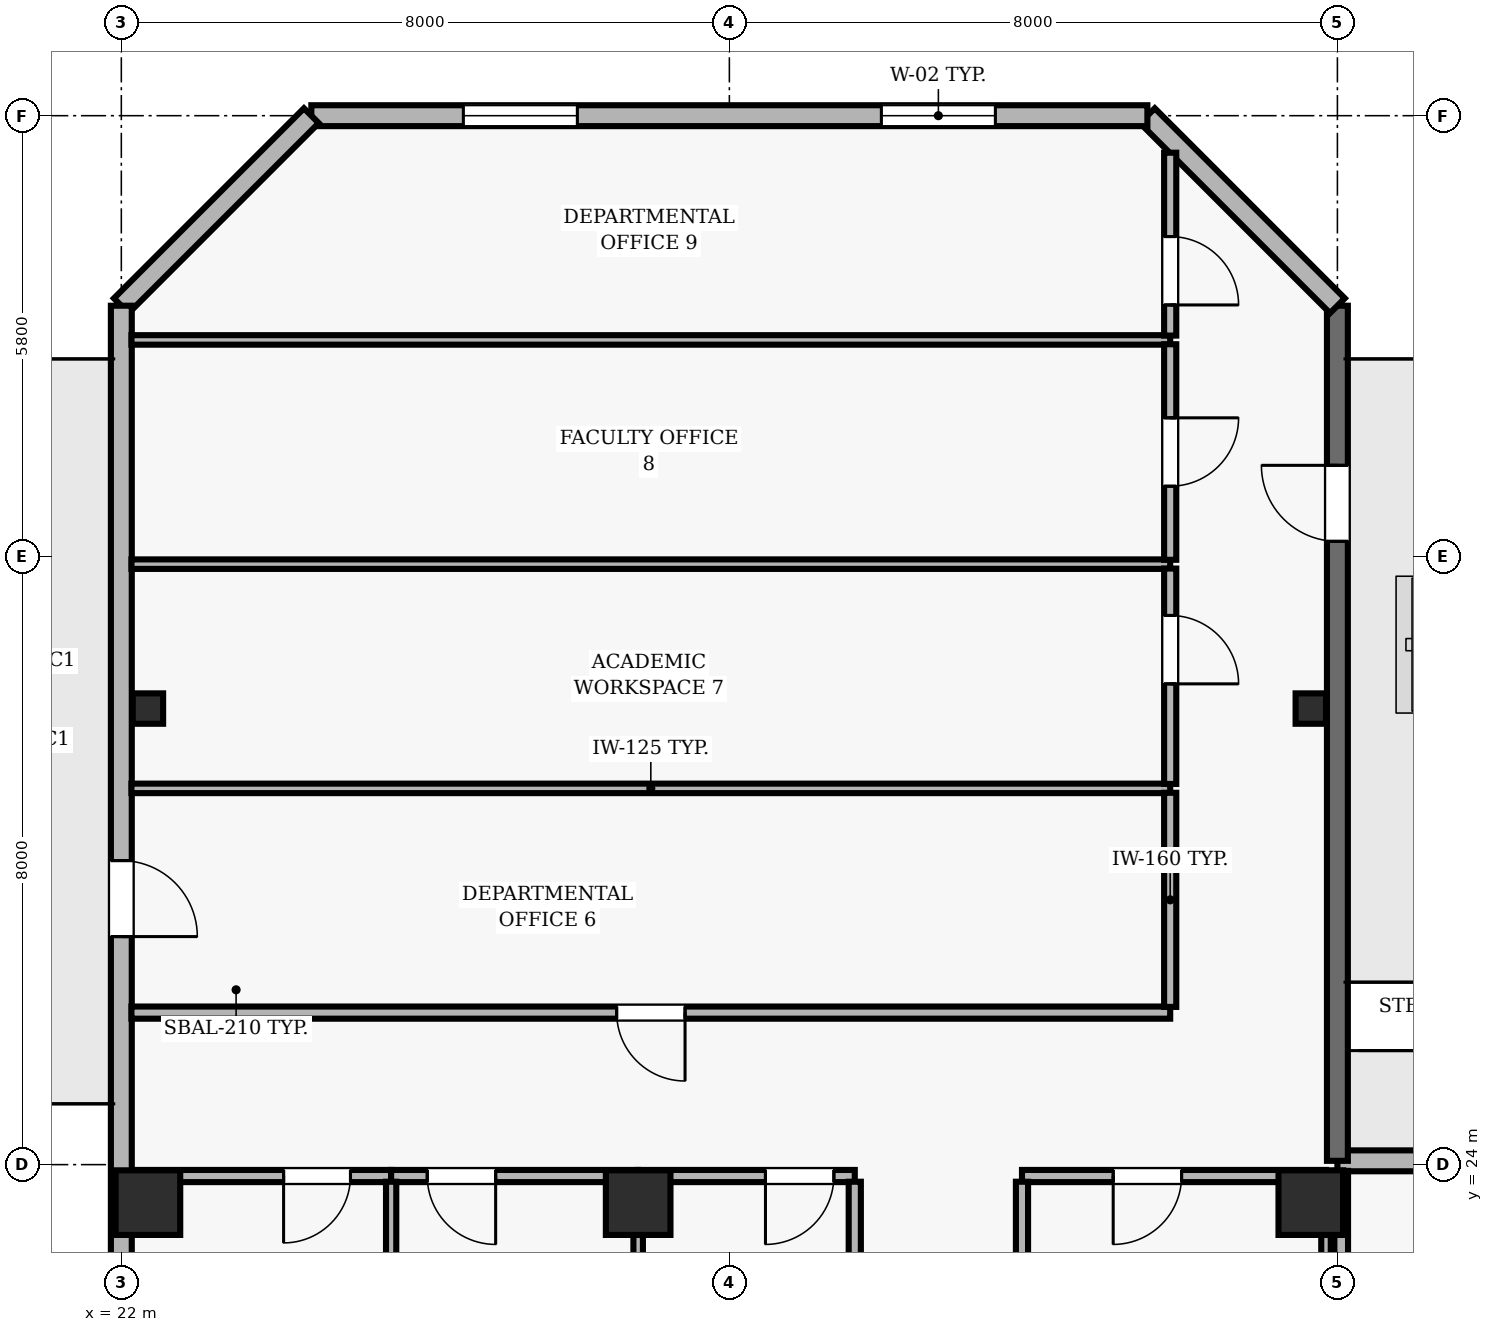
"""IFC4 building model, lengths in metres.
Left out: names, types, materials, properties, quantities, classifications, styles, units other than length and angle.
Written with IfcOpenShell. Run it as: python <this file> out.ifc"""

import sys

from ifc_helpers import new_model, si_unit, direction, frame, frame_2d, origin, origin_2d, place, context, subcontext, project, spatial, rectangle, hollow_rectangle, extrude, element, fill, save


model = new_model("IFC4")
c1 = context("Model", 3, precision=1e-05, world=origin(), true_north=direction((0.0, 1.0)))
c2 = subcontext(c1, "Body", "Model", "MODEL_VIEW")
j1 = project(units=[si_unit("LENGTHUNIT", "METRE"), si_unit("PLANEANGLEUNIT", "RADIAN")], contexts=[c1])
p1 = place(None, origin())
s1 = spatial("IfcSite", under=j1, at=p1, CompositionType="ELEMENT")
p2 = place(p1, origin())
s2 = spatial("IfcBuilding", under=s1, at=p2, CompositionType="ELEMENT")
p3 = place(p2, frame((0.0, 0.0, 259.9)))
s3 = spatial("IfcBuildingStorey", under=s2, at=p3, CompositionType="ELEMENT", Elevation=259.9)
for number, where, z_axis, x_axis in (
    (1, (22.35, 23.5, 0.0), (0.0, 0.0, 1.0), (1.0, 0.0, 0.0)),
    (2, (28.8, 23.5, 0.0), (0.0, 0.0, 1.0), (1.0, 0.0, 0.0)),
    (3, (37.65, 23.5, 0.0), (0.0, 0.0, 1.0), (1.0, 0.0, 0.0)),
):
    element("IfcColumn", number, at=place(p3, frame(where, z_axis=z_axis, x_axis=x_axis)), inside=s3, PredefinedType="COLUMN", context=c2, shape_type="SweptSolid", body=[
        extrude(rectangle(XDim=0.85, YDim=0.85, at=origin_2d()), origin(), (0.0, 0.0, 1.0), 3.9),
    ])
for number, where, z_axis, x_axis in (
    (4, (22.35, 30.0, 0.0), (0.0, 0.0, 1.0), (1.0, 0.0, 0.0)),
    (5, (37.65, 30.0, 0.0), (0.0, 0.0, 1.0), (1.0, 0.0, 0.0)),
):
    element("IfcColumn", number, at=place(p3, frame(where, z_axis=z_axis, x_axis=x_axis)), inside=s3, PredefinedType="COLUMN", context=c2, shape_type="SweptSolid", body=[
        extrude(hollow_rectangle(XDim=0.4, YDim=0.4, WallThickness=0.02, at=origin_2d()), origin(), (0.0, 0.0, 1.0), 3.9),
    ])
p4 = place(p3, frame((43.0, 24.05, 0.0), z_axis=(0.0, 0.0, 1.0), x_axis=(-1.0, 0.0, 0.0)))
e6 = element("IfcWall", 6, at=p4, inside=s3, PredefinedType="SOLIDWALL", context=c2, shape_type="SweptSolid", body=[
    extrude(rectangle(XDim=5.0, YDim=0.275, at=frame_2d((2.5, 0.0))), origin(), (0.0, 0.0, 1.0), 3.69),
])
p5 = place(p4, frame((1.825, 0.0, 0.0)))
e7 = element("IfcOpeningElement", 7, at=p5, cuts=e6, PredefinedType="OPENING", context=c2, shape_type="SweptSolid", body=[
    extrude(rectangle(XDim=1.35, YDim=2.2, at=frame_2d((0.675, 1.1))), frame((0.0, 0.147, 0.0), z_axis=(0.0, -1.0, 0.0), x_axis=(1.0, 0.0, 0.0)), (0.0, 0.0, 1.0), 0.295),
])
p6 = place(p3, frame((38.0, 24.05, 0.0), z_axis=(0.0, 0.0, 1.0), x_axis=(0.0, 1.0, 0.0)))
e8 = element("IfcWall", 8, at=p6, inside=s3, PredefinedType="SOLIDWALL", context=c2, shape_type="SweptSolid", body=[
    extrude(rectangle(XDim=11.25, YDim=0.275, at=frame_2d((5.625, 0.0))), origin(), (0.0, 0.0, 1.0), 3.69),
])
p7 = place(p6, frame((8.15, 0.0, 0.0)))
e9 = element("IfcOpeningElement", 9, at=p7, cuts=e8, PredefinedType="OPENING", context=c2, shape_type="SweptSolid", body=[
    extrude(rectangle(XDim=1.0, YDim=2.2, at=frame_2d((0.5, 1.1))), frame((0.0, 0.147, 0.0), z_axis=(0.0, -1.0, 0.0), x_axis=(1.0, 0.0, 0.0)), (0.0, 0.0, 1.0), 0.295),
])
p8 = place(p3, frame((38.0, 35.3, 0.0), z_axis=(0.0, 0.0, 1.0), x_axis=(-0.707106781187, 0.707106781187, 0.0)))
e10 = element("IfcWall", 10, at=p8, inside=s3, PredefinedType="SOLIDWALL", context=c2, shape_type="SweptSolid", body=[
    extrude(rectangle(XDim=3.536, YDim=0.275, at=frame_2d((1.768, 0.0))), origin(), (0.0, 0.0, 1.0), 3.69),
])
p9 = place(p3, frame((35.5, 37.8, 0.0), z_axis=(0.0, 0.0, 1.0), x_axis=(-1.0, 0.0, 0.0)))
e11 = element("IfcWall", 11, at=p9, inside=s3, PredefinedType="SOLIDWALL", context=c2, shape_type="SweptSolid", body=[
    extrude(rectangle(XDim=11.0, YDim=0.275, at=frame_2d((5.5, 0.0))), origin(), (0.0, 0.0, 1.0), 3.69),
])
p10 = place(p9, frame((2.0, 0.0, 0.9)))
e12 = element("IfcOpeningElement", 12, at=p10, cuts=e11, PredefinedType="OPENING", context=c2, shape_type="SweptSolid", body=[
    extrude(rectangle(XDim=1.5, YDim=1.6, at=frame_2d((0.75, 0.8))), frame((0.0, 0.147, 0.0), z_axis=(0.0, -1.0, 0.0), x_axis=(1.0, 0.0, 0.0)), (0.0, 0.0, 1.0), 0.295),
])
p11 = place(p9, frame((7.5, 0.0, 0.9)))
e13 = element("IfcOpeningElement", 13, at=p11, cuts=e11, PredefinedType="OPENING", context=c2, shape_type="SweptSolid", body=[
    extrude(rectangle(XDim=1.5, YDim=1.6, at=frame_2d((0.75, 0.8))), frame((0.0, 0.147, 0.0), z_axis=(0.0, -1.0, 0.0), x_axis=(1.0, 0.0, 0.0)), (0.0, 0.0, 1.0), 0.295),
])
p12 = place(p3, frame((24.5, 37.8, 0.0), z_axis=(0.0, 0.0, 1.0), x_axis=(-0.707106781187, -0.707106781187, 0.0)))
e14 = element("IfcWall", 14, at=p12, inside=s3, PredefinedType="SOLIDWALL", context=c2, shape_type="SweptSolid", body=[
    extrude(rectangle(XDim=3.536, YDim=0.275, at=frame_2d((1.768, 0.0))), origin(), (0.0, 0.0, 1.0), 3.69),
])
p13 = place(p3, frame((22.0, 35.3, 0.0), z_axis=(0.0, 0.0, 1.0), x_axis=(0.0, -1.0, 0.0)))
e15 = element("IfcWall", 15, at=p13, inside=s3, PredefinedType="SOLIDWALL", context=c2, shape_type="SweptSolid", body=[
    extrude(rectangle(XDim=32.8, YDim=0.275, at=frame_2d((16.4, 0.0))), origin(), (0.0, 0.0, 1.0), 3.69),
])
p14 = place(p13, frame((7.3, 0.0, 0.0)))
e16 = element("IfcOpeningElement", 16, at=p14, cuts=e15, PredefinedType="OPENING", context=c2, shape_type="SweptSolid", body=[
    extrude(rectangle(XDim=1.0, YDim=2.2, at=frame_2d((0.5, 1.1))), frame((0.0, 0.147, 0.0), z_axis=(0.0, -1.0, 0.0), x_axis=(1.0, 0.0, 0.0)), (0.0, 0.0, 1.0), 0.295),
])
p15 = place(p13, frame((12.617, 0.0, 0.9)))
e17 = element("IfcOpeningElement", 17, at=p15, cuts=e15, PredefinedType="OPENING", context=c2, shape_type="SweptSolid", body=[
    extrude(rectangle(XDim=2.1, YDim=1.6, at=frame_2d((1.05, 0.8))), frame((0.0, 0.147, 0.0), z_axis=(0.0, -1.0, 0.0), x_axis=(1.0, 0.0, 0.0)), (0.0, 0.0, 1.0), 0.295),
])
p16 = place(p13, frame((17.633, 0.0, 0.9)))
e18 = element("IfcOpeningElement", 18, at=p16, cuts=e15, PredefinedType="OPENING", context=c2, shape_type="SweptSolid", body=[
    extrude(rectangle(XDim=2.1, YDim=1.6, at=frame_2d((1.05, 0.8))), frame((0.0, 0.147, 0.0), z_axis=(0.0, -1.0, 0.0), x_axis=(1.0, 0.0, 0.0)), (0.0, 0.0, 1.0), 0.295),
])
p17 = place(p13, frame((23.55, 0.0, 0.9)))
e19 = element("IfcOpeningElement", 19, at=p17, cuts=e15, PredefinedType="OPENING", context=c2, shape_type="SweptSolid", body=[
    extrude(rectangle(XDim=2.1, YDim=1.6, at=frame_2d((1.05, 0.8))), frame((0.0, 0.147, 0.0), z_axis=(0.0, -1.0, 0.0), x_axis=(1.0, 0.0, 0.0)), (0.0, 0.0, 1.0), 0.295),
])
p18 = place(p3, frame((25.55, 23.85, 0.0), z_axis=(0.0, 0.0, 1.0), x_axis=(-1.0, 0.0, 0.0)))
e20 = element("IfcWall", 20, at=p18, inside=s3, PredefinedType="PARTITIONING", context=c2, shape_type="SweptSolid", body=[
    extrude(rectangle(XDim=3.35, YDim=0.16, at=frame_2d((1.675, 0.0))), origin(), (0.0, 0.0, 1.0), 3.227),
])
p19 = place(p18, frame((0.535, 0.0, 0.0)))
e21 = element("IfcOpeningElement", 21, at=p19, cuts=e20, PredefinedType="OPENING", context=c2, shape_type="SweptSolid", body=[
    extrude(rectangle(XDim=0.88, YDim=2.1, at=frame_2d((0.44, 1.05))), frame((0.0, 0.09, 0.0), z_axis=(0.0, -1.0, 0.0), x_axis=(1.0, 0.0, 0.0)), (0.0, 0.0, 1.0), 0.18),
])
p20 = place(p3, frame((28.8, 23.85, 0.0), z_axis=(0.0, 0.0, 1.0), x_axis=(-1.0, 0.0, 0.0)))
e22 = element("IfcWall", 22, at=p20, inside=s3, PredefinedType="PARTITIONING", context=c2, shape_type="SweptSolid", body=[
    extrude(rectangle(XDim=3.25, YDim=0.16, at=frame_2d((1.625, 0.0))), origin(), (0.0, 0.0, 1.0), 3.227),
])
p21 = place(p20, frame((1.875, 0.0, 0.0)))
e23 = element("IfcOpeningElement", 23, at=p21, cuts=e22, PredefinedType="OPENING", context=c2, shape_type="SweptSolid", body=[
    extrude(rectangle(XDim=0.9, YDim=2.1, at=frame_2d((0.45, 1.05))), frame((0.0, 0.09, 0.0), z_axis=(0.0, -1.0, 0.0), x_axis=(1.0, 0.0, 0.0)), (0.0, 0.0, 1.0), 0.18),
])
p22 = place(p3, frame((31.65, 23.85, 0.0), z_axis=(0.0, 0.0, 1.0), x_axis=(-1.0, 0.0, 0.0)))
e24 = element("IfcWall", 24, at=p22, inside=s3, PredefinedType="PARTITIONING", context=c2, shape_type="SweptSolid", body=[
    extrude(rectangle(XDim=2.85, YDim=0.16, at=frame_2d((1.425, 0.0))), origin(), (0.0, 0.0, 1.0), 3.227),
])
p23 = place(p22, frame((0.275, 0.0, 0.0)))
e25 = element("IfcOpeningElement", 25, at=p23, cuts=e24, PredefinedType="OPENING", context=c2, shape_type="SweptSolid", body=[
    extrude(rectangle(XDim=0.9, YDim=2.1, at=frame_2d((0.45, 1.05))), frame((0.0, 0.09, 0.0), z_axis=(0.0, -1.0, 0.0), x_axis=(1.0, 0.0, 0.0)), (0.0, 0.0, 1.0), 0.18),
])
p24 = place(p3, frame((35.8, 26.0, 0.0), z_axis=(0.0, 0.0, 1.0), x_axis=(-1.0, 0.0, 0.0)))
e26 = element("IfcWall", 26, at=p24, inside=s3, PredefinedType="PARTITIONING", context=c2, shape_type="SweptSolid", body=[
    extrude(rectangle(XDim=13.667, YDim=0.16, at=frame_2d((6.833, 0.0))), origin(), (0.0, 0.0, 1.0), 3.69),
])
p25 = place(p24, frame((6.383, 0.0, 0.0)))
e27 = element("IfcOpeningElement", 27, at=p25, cuts=e26, PredefinedType="OPENING", context=c2, shape_type="SweptSolid", body=[
    extrude(rectangle(XDim=0.9, YDim=2.1, at=frame_2d((0.45, 1.05))), frame((0.0, 0.09, 0.0), z_axis=(0.0, -1.0, 0.0), x_axis=(1.0, 0.0, 0.0)), (0.0, 0.0, 1.0), 0.18),
])
for number, where, z_axis, x_axis in (
    (28, (35.8, 28.95, 0.0), (0.0, 0.0, 1.0), (-1.0, 0.0, 0.0)),
    (29, (35.8, 31.9, 0.0), (0.0, 0.0, 1.0), (-1.0, 0.0, 0.0)),
    (30, (35.8, 34.85, 0.0), (0.0, 0.0, 1.0), (-1.0, 0.0, 0.0)),
):
    element("IfcWall", number, at=place(p3, frame(where, z_axis=z_axis, x_axis=x_axis)), inside=s3, PredefinedType="PARTITIONING", context=c2, shape_type="SweptSolid", body=[
        extrude(rectangle(XDim=13.667, YDim=0.125, at=frame_2d((6.833, 0.0))), origin(), (0.0, 0.0, 1.0), 3.69),
    ])
p26 = place(p3, frame((37.85, 23.85, 0.0), z_axis=(0.0, 0.0, 1.0), x_axis=(-1.0, 0.0, 0.0)))
e31 = element("IfcWall", 31, at=p26, inside=s3, PredefinedType="PARTITIONING", context=c2, shape_type="SweptSolid", body=[
    extrude(rectangle(XDim=4.0, YDim=0.16, at=frame_2d((2.0, 0.0))), origin(), (0.0, 0.0, 1.0), 3.227),
])
p27 = place(p26, frame((1.9, 0.0, 0.0)))
e32 = element("IfcOpeningElement", 32, at=p27, cuts=e31, PredefinedType="OPENING", context=c2, shape_type="SweptSolid", body=[
    extrude(rectangle(XDim=0.9, YDim=2.1, at=frame_2d((0.45, 1.05))), frame((0.0, 0.09, 0.0), z_axis=(0.0, -1.0, 0.0), x_axis=(1.0, 0.0, 0.0)), (0.0, 0.0, 1.0), 0.18),
])
p28 = place(p3, frame((25.55, 19.16, 0.0), z_axis=(0.0, 0.0, 1.0), x_axis=(0.0, 1.0, 0.0)))
e33 = element("IfcWall", 33, at=p28, inside=s3, PredefinedType="PARTITIONING", context=c2, shape_type="SweptSolid", body=[
    extrude(rectangle(XDim=4.615, YDim=0.135, at=frame_2d((2.308, 0.0))), origin(), (0.0, 0.0, 1.0), 3.69),
])
p29 = place(p3, frame((28.8, 23.775, 0.0), z_axis=(0.0, 0.0, 1.0), x_axis=(0.0, -1.0, 0.0)))
e34 = element("IfcWall", 34, at=p29, inside=s3, PredefinedType="PARTITIONING", context=c2, shape_type="SweptSolid", body=[
    extrude(rectangle(XDim=2.267, YDim=0.125, at=frame_2d((1.133, 0.0))), origin(), (0.0, 0.0, 1.0), 3.69),
])
p30 = place(p3, frame((31.65, 23.775, 0.0), z_axis=(0.0, 0.0, 1.0), x_axis=(0.0, -1.0, 0.0)))
e35 = element("IfcWall", 35, at=p30, inside=s3, PredefinedType="PARTITIONING", context=c2, shape_type="SweptSolid", body=[
    extrude(rectangle(XDim=2.267, YDim=0.16, at=frame_2d((1.133, 0.0))), origin(), (0.0, 0.0, 1.0), 3.69),
])
p31 = place(p3, frame((33.85, 20.835, 0.0), z_axis=(0.0, 0.0, 1.0), x_axis=(0.0, 1.0, 0.0)))
e36 = element("IfcWall", 36, at=p31, inside=s3, PredefinedType="PARTITIONING", context=c2, shape_type="SweptSolid", body=[
    extrude(rectangle(XDim=2.94, YDim=0.16, at=frame_2d((1.47, 0.0))), origin(), (0.0, 0.0, 1.0), 3.69),
])
p32 = place(p3, frame((35.8, 28.892, 0.0), z_axis=(0.0, 0.0, 1.0), x_axis=(0.0, -1.0, 0.0)))
e37 = element("IfcWall", 37, at=p32, inside=s3, PredefinedType="PARTITIONING", context=c2, shape_type="SweptSolid", body=[
    extrude(rectangle(XDim=2.817, YDim=0.16, at=frame_2d((1.409, 0.0))), origin(), (0.0, 0.0, 1.0), 3.69),
])
p33 = place(p3, frame((35.8, 31.842, 0.0), z_axis=(0.0, 0.0, 1.0), x_axis=(0.0, -1.0, 0.0)))
e38 = element("IfcWall", 38, at=p33, inside=s3, PredefinedType="PARTITIONING", context=c2, shape_type="SweptSolid", body=[
    extrude(rectangle(XDim=2.834, YDim=0.16, at=frame_2d((1.417, 0.0))), origin(), (0.0, 0.0, 1.0), 3.69),
])
p34 = place(p33, frame((0.617, 0.0, 0.0)))
e39 = element("IfcOpeningElement", 39, at=p34, cuts=e38, PredefinedType="OPENING", context=c2, shape_type="SweptSolid", body=[
    extrude(rectangle(XDim=0.9, YDim=2.1, at=frame_2d((0.45, 1.05))), frame((0.0, 0.09, 0.0), z_axis=(0.0, -1.0, 0.0), x_axis=(1.0, 0.0, 0.0)), (0.0, 0.0, 1.0), 0.18),
])
p35 = place(p3, frame((35.8, 34.793, 0.0), z_axis=(0.0, 0.0, 1.0), x_axis=(0.0, -1.0, 0.0)))
e40 = element("IfcWall", 40, at=p35, inside=s3, PredefinedType="PARTITIONING", context=c2, shape_type="SweptSolid", body=[
    extrude(rectangle(XDim=2.836, YDim=0.16, at=frame_2d((1.418, 0.0))), origin(), (0.0, 0.0, 1.0), 3.69),
])
p36 = place(p35, frame((0.968, 0.0, 0.0)))
e41 = element("IfcOpeningElement", 41, at=p36, cuts=e40, PredefinedType="OPENING", context=c2, shape_type="SweptSolid", body=[
    extrude(rectangle(XDim=0.9, YDim=2.1, at=frame_2d((0.45, 1.05))), frame((0.0, 0.09, 0.0), z_axis=(0.0, -1.0, 0.0), x_axis=(1.0, 0.0, 0.0)), (0.0, 0.0, 1.0), 0.18),
])
p37 = place(p3, frame((35.8, 37.313, 0.0), z_axis=(0.0, 0.0, 1.0), x_axis=(0.0, -1.0, 0.0)))
e42 = element("IfcWall", 42, at=p37, inside=s3, PredefinedType="PARTITIONING", context=c2, shape_type="SweptSolid", body=[
    extrude(rectangle(XDim=2.406, YDim=0.16, at=frame_2d((1.203, 0.0))), origin(), (0.0, 0.0, 1.0), 3.69),
])
p38 = place(p37, frame((1.103, 0.0, 0.0)))
e43 = element("IfcOpeningElement", 43, at=p38, cuts=e42, PredefinedType="OPENING", context=c2, shape_type="SweptSolid", body=[
    extrude(rectangle(XDim=0.9, YDim=2.1, at=frame_2d((0.45, 1.05))), frame((0.0, 0.09, 0.0), z_axis=(0.0, -1.0, 0.0), x_axis=(1.0, 0.0, 0.0)), (0.0, 0.0, 1.0), 0.18),
])
p39 = place(p3, frame((37.85, 20.835, 0.0), z_axis=(0.0, 0.0, 1.0), x_axis=(0.0, 1.0, 0.0)))
e44 = element("IfcWall", 44, at=p39, inside=s3, PredefinedType="PARTITIONING", context=c2, shape_type="SweptSolid", body=[
    extrude(rectangle(XDim=2.94, YDim=0.125, at=frame_2d((1.47, 0.0))), origin(), (0.0, 0.0, 1.0), 3.227),
])
p40 = place(p3, frame((38.05, 23.918, 0.0), z_axis=(0.0, 0.0, 1.0), x_axis=(0.0, -1.0, 0.0)))
e45 = element("IfcWall", 45, at=p40, inside=s3, PredefinedType="PARTITIONING", context=c2, shape_type="SweptSolid", body=[
    extrude(rectangle(XDim=7.843, YDim=0.18, at=frame_2d((3.921, 0.0))), origin(), (0.0, 0.0, 1.0), 3.227),
])
p41 = place(p7, origin())
e46 = element("IfcDoor", 46, at=p41, inside=s3, OperationType="SINGLE_SWING_RIGHT", PredefinedType="DOOR", context=c2, shape_type="SweptSolid", body=[
    extrude(rectangle(XDim=1.0, YDim=2.2, at=frame_2d((0.5, 1.1))), frame((0.0, 0.025, 0.0), z_axis=(0.0, -1.0, 0.0), x_axis=(1.0, 0.0, 0.0)), (0.0, 0.0, 1.0), 0.05),
])
fill(e9, e46)
p42 = place(p10, origin())
e47 = element("IfcWindow", 47, at=p42, inside=s3, PartitioningType="SINGLE_PANEL", PredefinedType="WINDOW", context=c2, shape_type="SweptSolid", body=[
    extrude(rectangle(XDim=1.5, YDim=1.6, at=frame_2d((0.75, 0.8))), frame((0.0, 0.03, 0.0), z_axis=(0.0, -1.0, 0.0), x_axis=(1.0, 0.0, 0.0)), (0.0, 0.0, 1.0), 0.06),
])
fill(e12, e47)
p43 = place(p11, origin())
e48 = element("IfcWindow", 48, at=p43, inside=s3, PartitioningType="SINGLE_PANEL", PredefinedType="WINDOW", context=c2, shape_type="SweptSolid", body=[
    extrude(rectangle(XDim=1.5, YDim=1.6, at=frame_2d((0.75, 0.8))), frame((0.0, 0.03, 0.0), z_axis=(0.0, -1.0, 0.0), x_axis=(1.0, 0.0, 0.0)), (0.0, 0.0, 1.0), 0.06),
])
fill(e13, e48)
p44 = place(p14, origin())
e49 = element("IfcDoor", 49, at=p44, inside=s3, OperationType="SINGLE_SWING_RIGHT", PredefinedType="DOOR", context=c2, shape_type="SweptSolid", body=[
    extrude(rectangle(XDim=1.0, YDim=2.2, at=frame_2d((0.5, 1.1))), frame((0.0, 0.025, 0.0), z_axis=(0.0, -1.0, 0.0), x_axis=(1.0, 0.0, 0.0)), (0.0, 0.0, 1.0), 0.05),
])
fill(e16, e49)
p45 = place(p27, origin())
e50 = element("IfcDoor", 50, at=p45, inside=s3, OperationType="SINGLE_SWING_RIGHT", PredefinedType="DOOR", context=c2, shape_type="SweptSolid", body=[
    extrude(rectangle(XDim=0.9, YDim=2.1, at=frame_2d((0.45, 1.05))), frame((0.0, 0.025, 0.0), z_axis=(0.0, -1.0, 0.0), x_axis=(1.0, 0.0, 0.0)), (0.0, 0.0, 1.0), 0.05),
])
fill(e32, e50)
p46 = place(p23, origin())
e51 = element("IfcDoor", 51, at=p46, inside=s3, OperationType="SINGLE_SWING_RIGHT", PredefinedType="DOOR", context=c2, shape_type="SweptSolid", body=[
    extrude(rectangle(XDim=0.9, YDim=2.1, at=frame_2d((0.45, 1.05))), frame((0.0, 0.025, 0.0), z_axis=(0.0, -1.0, 0.0), x_axis=(1.0, 0.0, 0.0)), (0.0, 0.0, 1.0), 0.05),
])
fill(e25, e51)
p47 = place(p19, origin())
e52 = element("IfcDoor", 52, at=p47, inside=s3, OperationType="SINGLE_SWING_RIGHT", PredefinedType="DOOR", context=c2, shape_type="SweptSolid", body=[
    extrude(rectangle(XDim=0.88, YDim=2.1, at=frame_2d((0.44, 1.05))), frame((0.0, 0.025, 0.0), z_axis=(0.0, -1.0, 0.0), x_axis=(1.0, 0.0, 0.0)), (0.0, 0.0, 1.0), 0.05),
])
fill(e21, e52)
p48 = place(p21, origin())
e53 = element("IfcDoor", 53, at=p48, inside=s3, OperationType="SINGLE_SWING_LEFT", PredefinedType="DOOR", context=c2, shape_type="SweptSolid", body=[
    extrude(rectangle(XDim=0.9, YDim=2.1, at=frame_2d((0.45, 1.05))), frame((0.0, 0.025, 0.0), z_axis=(0.0, -1.0, 0.0), x_axis=(1.0, 0.0, 0.0)), (0.0, 0.0, 1.0), 0.05),
])
fill(e23, e53)
p49 = place(p25, origin())
e54 = element("IfcDoor", 54, at=p49, inside=s3, OperationType="SINGLE_SWING_LEFT", PredefinedType="DOOR", context=c2, shape_type="SweptSolid", body=[
    extrude(rectangle(XDim=0.9, YDim=2.1, at=frame_2d((0.45, 1.05))), frame((0.0, 0.025, 0.0), z_axis=(0.0, -1.0, 0.0), x_axis=(1.0, 0.0, 0.0)), (0.0, 0.0, 1.0), 0.05),
])
fill(e27, e54)
p50 = place(p34, origin())
e55 = element("IfcDoor", 55, at=p50, inside=s3, OperationType="SINGLE_SWING_RIGHT", PredefinedType="DOOR", context=c2, shape_type="SweptSolid", body=[
    extrude(rectangle(XDim=0.9, YDim=2.1, at=frame_2d((0.45, 1.05))), frame((0.0, 0.025, 0.0), z_axis=(0.0, -1.0, 0.0), x_axis=(1.0, 0.0, 0.0)), (0.0, 0.0, 1.0), 0.05),
])
fill(e39, e55)
p51 = place(p36, origin())
e56 = element("IfcDoor", 56, at=p51, inside=s3, OperationType="SINGLE_SWING_LEFT", PredefinedType="DOOR", context=c2, shape_type="SweptSolid", body=[
    extrude(rectangle(XDim=0.9, YDim=2.1, at=frame_2d((0.45, 1.05))), frame((0.0, 0.025, 0.0), z_axis=(0.0, -1.0, 0.0), x_axis=(1.0, 0.0, 0.0)), (0.0, 0.0, 1.0), 0.05),
])
fill(e41, e56)
p52 = place(p38, origin())
e57 = element("IfcDoor", 57, at=p52, inside=s3, OperationType="SINGLE_SWING_RIGHT", PredefinedType="DOOR", context=c2, shape_type="SweptSolid", body=[
    extrude(rectangle(XDim=0.9, YDim=2.1, at=frame_2d((0.45, 1.05))), frame((0.0, 0.025, 0.0), z_axis=(0.0, -1.0, 0.0), x_axis=(1.0, 0.0, 0.0)), (0.0, 0.0, 1.0), 0.05),
])
fill(e43, e57)
save(model, sys.argv[1])
